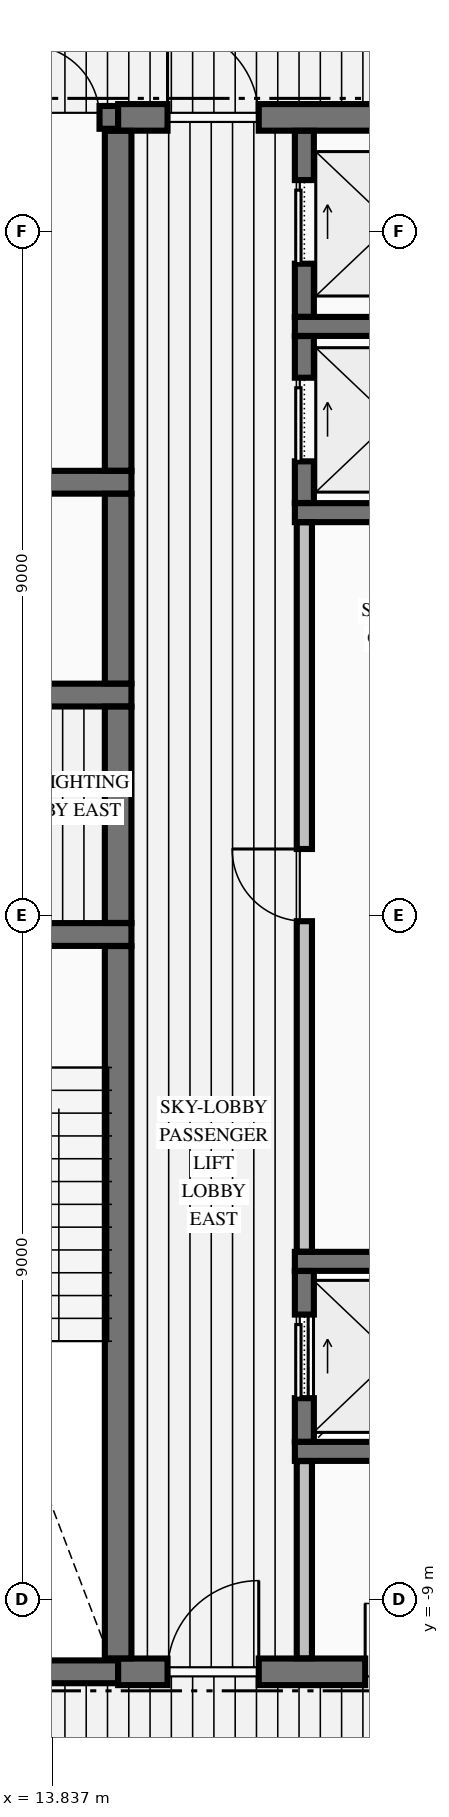
"""IFC4 building model, lengths in metres.
Left out: names, types, materials, properties, quantities, classifications, styles, units other than length and angle.
Written with IfcOpenShell. Run it as: python <this file> out.ifc"""

import sys

from ifc_helpers import new_model, si_unit, direction, frame, frame_2d, origin, place, context, subcontext, project, spatial, rectangle, extrude, element, fill, save


model = new_model("IFC4")
c1 = context("Model", 3, precision=1e-05, world=origin(), true_north=direction((0.0, 1.0)))
c2 = subcontext(c1, "Body", "Model", "MODEL_VIEW")
j1 = project(units=[si_unit("LENGTHUNIT", "METRE"), si_unit("PLANEANGLEUNIT", "RADIAN")], contexts=[c1])
p1 = place(None, origin())
s1 = spatial("IfcSite", under=j1, at=p1, CompositionType="ELEMENT")
p2 = place(p1, origin())
s2 = spatial("IfcBuilding", under=s1, at=p2, CompositionType="ELEMENT")
p3 = place(p2, frame((0.0, 0.0, 158.24)))
s3 = spatial("IfcBuildingStorey", under=s2, at=p3, CompositionType="ELEMENT", Elevation=158.24)
p4 = place(p3, frame((11.429, -9.95, 0.0), z_axis=(0.0, 0.0, 1.0), x_axis=(1.0, 0.0, 0.0)))
e1 = element("IfcWall", 1, at=p4, inside=s3, PredefinedType="SHEAR", context=c2, shape_type="SweptSolid", body=[
    extrude(rectangle(XDim=3.271, YDim=0.3, at=frame_2d((1.635, 0.0))), origin(), (0.0, 0.0, 1.0), 4.17),
])
p5 = place(p3, frame((14.7, -9.95, 0.0), z_axis=(0.0, 0.0, 1.0), x_axis=(1.0, 0.0, 0.0)))
e2 = element("IfcWall", 2, at=p5, inside=s3, PredefinedType="SHEAR", context=c2, shape_type="SweptSolid", body=[
    extrude(rectangle(XDim=4.871, YDim=0.35, at=frame_2d((2.436, 0.0))), origin(), (0.0, 0.0, 1.0), 4.17),
])
p6 = place(p5, frame((0.65, 0.0, 0.0)))
e3 = element("IfcOpeningElement", 3, at=p6, cuts=e2, PredefinedType="OPENING", context=c2, shape_type="SweptSolid", body=[
    extrude(rectangle(XDim=1.2, YDim=2.15, at=frame_2d((0.6, 1.075))), frame((0.0, 0.185, 0.0), z_axis=(0.0, -1.0, 0.0), x_axis=(1.0, 0.0, 0.0)), (0.0, 0.0, 1.0), 0.37),
])
p7 = place(p5, frame((3.25, 0.0, 0.0)))
e4 = element("IfcOpeningElement", 4, at=p7, cuts=e2, PredefinedType="OPENING", context=c2, shape_type="SweptSolid", body=[
    extrude(rectangle(XDim=0.9, YDim=2.15, at=frame_2d((0.45, 1.075))), frame((0.0, 0.185, 0.0), z_axis=(0.0, -1.0, 0.0), x_axis=(1.0, 0.0, 0.0)), (0.0, 0.0, 1.0), 0.37),
])
for number, where, z_axis, x_axis in (
    (5, (17.025, -7.05, 0.0), (0.0, 0.0, 1.0), (1.0, 0.0, 0.0)),
    (6, (17.025, -4.55, 0.0), (0.0, 0.0, 1.0), (1.0, 0.0, 0.0)),
):
    element("IfcWall", number, at=place(p3, frame(where, z_axis=z_axis, x_axis=x_axis)), inside=s3, PredefinedType="SOLIDWALL", context=c2, shape_type="SweptSolid", body=[
        extrude(rectangle(XDim=3.15, YDim=0.25, at=frame_2d((1.575, 0.0))), origin(), (0.0, 0.0, 1.0), 4.17),
    ])
p8 = place(p3, frame((11.429, -0.25, 0.0), z_axis=(0.0, 0.0, 1.0), x_axis=(1.0, 0.0, 0.0)))
e7 = element("IfcWall", 7, at=p8, inside=s3, PredefinedType="SHEAR", context=c2, shape_type="SweptSolid", body=[
    extrude(rectangle(XDim=3.446, YDim=0.3, at=frame_2d((1.723, 0.0))), origin(), (0.0, 0.0, 1.0), 4.17),
])
p9 = place(p8, frame((1.171, 0.0, 0.0)))
e8 = element("IfcOpeningElement", 8, at=p9, cuts=e7, PredefinedType="OPENING", context=c2, shape_type="SweptSolid", body=[
    extrude(rectangle(XDim=1.1, YDim=2.15, at=frame_2d((0.55, 1.075))), frame((0.0, 0.16, 0.0), z_axis=(0.0, -1.0, 0.0), x_axis=(1.0, 0.0, 0.0)), (0.0, 0.0, 1.0), 0.32),
])
p10 = place(p3, frame((10.85, 2.9, 0.0), z_axis=(0.0, 0.0, 1.0), x_axis=(1.0, 0.0, 0.0)))
e9 = element("IfcWall", 9, at=p10, inside=s3, PredefinedType="SHEAR", context=c2, shape_type="SweptSolid", body=[
    extrude(rectangle(XDim=4.025, YDim=0.3, at=frame_2d((2.012, 0.0))), origin(), (0.0, 0.0, 1.0), 4.17),
])
p11 = place(p10, frame((0.85, 0.0, 0.0)))
e10 = element("IfcOpeningElement", 10, at=p11, cuts=e9, PredefinedType="OPENING", context=c2, shape_type="SweptSolid", body=[
    extrude(rectangle(XDim=1.1, YDim=2.2, at=frame_2d((0.55, 1.1))), frame((0.0, 0.16, 0.0), z_axis=(0.0, -1.0, 0.0), x_axis=(1.0, 0.0, 0.0)), (0.0, 0.0, 1.0), 0.32),
])
p12 = place(p3, frame((17.025, 5.3, 0.0), z_axis=(0.0, 0.0, 1.0), x_axis=(1.0, 0.0, 0.0)))
e11 = element("IfcWall", 11, at=p12, inside=s3, PredefinedType="SOLIDWALL", context=c2, shape_type="SweptSolid", body=[
    extrude(rectangle(XDim=3.15, YDim=0.25, at=frame_2d((1.575, 0.0))), origin(), (0.0, 0.0, 1.0), 4.17),
])
p13 = place(p3, frame((10.85, 5.7, 0.0), z_axis=(0.0, 0.0, 1.0), x_axis=(1.0, 0.0, 0.0)))
e12 = element("IfcWall", 12, at=p13, inside=s3, PredefinedType="SHEAR", context=c2, shape_type="SweptSolid", body=[
    extrude(rectangle(XDim=4.025, YDim=0.3, at=frame_2d((2.012, 0.0))), origin(), (0.0, 0.0, 1.0), 4.17),
])
p14 = place(p3, frame((17.025, 7.75, 0.0), z_axis=(0.0, 0.0, 1.0), x_axis=(1.0, 0.0, 0.0)))
e13 = element("IfcWall", 13, at=p14, inside=s3, PredefinedType="SOLIDWALL", context=c2, shape_type="SweptSolid", body=[
    extrude(rectangle(XDim=3.15, YDim=0.25, at=frame_2d((1.575, 0.0))), origin(), (0.0, 0.0, 1.0), 4.17),
])
p15 = place(p3, frame((11.429, 10.5, 0.0), z_axis=(0.0, 0.0, 1.0), x_axis=(1.0, 0.0, 0.0)))
e14 = element("IfcWall", 14, at=p15, inside=s3, PredefinedType="SHEAR", context=c2, shape_type="SweptSolid", body=[
    extrude(rectangle(XDim=3.271, YDim=0.3, at=frame_2d((1.635, 0.0))), origin(), (0.0, 0.0, 1.0), 4.17),
])
p16 = place(p15, frame((2.076, 0.0, 0.0)))
e15 = element("IfcOpeningElement", 15, at=p16, cuts=e14, PredefinedType="OPENING", context=c2, shape_type="SweptSolid", body=[
    extrude(rectangle(XDim=0.95, YDim=2.15, at=frame_2d((0.475, 1.075))), frame((0.0, 0.16, 0.0), z_axis=(0.0, -1.0, 0.0), x_axis=(1.0, 0.0, 0.0)), (0.0, 0.0, 1.0), 0.32),
])
p17 = place(p3, frame((14.7, 10.5, 0.0), z_axis=(0.0, 0.0, 1.0), x_axis=(1.0, 0.0, 0.0)))
e16 = element("IfcWall", 16, at=p17, inside=s3, PredefinedType="SHEAR", context=c2, shape_type="SweptSolid", body=[
    extrude(rectangle(XDim=4.871, YDim=0.35, at=frame_2d((2.436, 0.0))), origin(), (0.0, 0.0, 1.0), 4.17),
])
p18 = place(p17, frame((0.65, 0.0, 0.0)))
e17 = element("IfcOpeningElement", 17, at=p18, cuts=e16, PredefinedType="OPENING", context=c2, shape_type="SweptSolid", body=[
    extrude(rectangle(XDim=1.2, YDim=2.15, at=frame_2d((0.6, 1.075))), frame((0.0, 0.185, 0.0), z_axis=(0.0, -1.0, 0.0), x_axis=(1.0, 0.0, 0.0)), (0.0, 0.0, 1.0), 0.37),
])
p19 = place(p3, frame((14.7, -9.773, 0.0), z_axis=(0.0, 0.0, 1.0), x_axis=(0.0, 1.0, 0.0)))
e18 = element("IfcWall", 18, at=p19, inside=s3, PredefinedType="SHEAR", context=c2, shape_type="SweptSolid", body=[
    extrude(rectangle(XDim=9.371, YDim=0.35, at=frame_2d((4.686, 0.0))), origin(), (0.0, 0.0, 1.0), 4.17),
])
p20 = place(p3, frame((14.7, -0.098, 0.0), z_axis=(0.0, 0.0, 1.0), x_axis=(0.0, 1.0, 0.0)))
e19 = element("IfcWall", 19, at=p20, inside=s3, PredefinedType="SHEAR", context=c2, shape_type="SweptSolid", body=[
    extrude(rectangle(XDim=2.846, YDim=0.35, at=frame_2d((1.423, 0.0))), origin(), (0.0, 0.0, 1.0), 4.17),
])
p21 = place(p3, frame((14.7, 3.052, 0.0), z_axis=(0.0, 0.0, 1.0), x_axis=(0.0, 1.0, 0.0)))
e20 = element("IfcWall", 20, at=p21, inside=s3, PredefinedType="SHEAR", context=c2, shape_type="SweptSolid", body=[
    extrude(rectangle(XDim=2.496, YDim=0.35, at=frame_2d((1.248, 0.0))), origin(), (0.0, 0.0, 1.0), 4.17),
])
p22 = place(p3, frame((14.7, 5.852, 0.0), z_axis=(0.0, 0.0, 1.0), x_axis=(0.0, 1.0, 0.0)))
e21 = element("IfcWall", 21, at=p22, inside=s3, PredefinedType="SHEAR", context=c2, shape_type="SweptSolid", body=[
    extrude(rectangle(XDim=4.471, YDim=0.35, at=frame_2d((2.235, 0.0))), origin(), (0.0, 0.0, 1.0), 4.17),
])
p23 = place(p3, frame((17.15, -6.923, 0.0), z_axis=(0.0, 0.0, 1.0), x_axis=(0.0, 1.0, 0.0)))
e22 = element("IfcWall", 22, at=p23, inside=s3, PredefinedType="SOLIDWALL", context=c2, shape_type="SweptSolid", body=[
    extrude(rectangle(XDim=2.246, YDim=0.25, at=frame_2d((1.123, 0.0))), origin(), (0.0, 0.0, 1.0), 4.17),
])
p24 = place(p23, frame((0.573, 0.0, 0.0)))
e23 = element("IfcOpeningElement", 23, at=p24, cuts=e22, PredefinedType="OPENING", context=c2, shape_type="SweptSolid", body=[
    extrude(rectangle(XDim=1.1, YDim=2.2, at=frame_2d((0.55, 1.1))), frame((0.0, 0.135, 0.0), z_axis=(0.0, -1.0, 0.0), x_axis=(1.0, 0.0, 0.0)), (0.0, 0.0, 1.0), 0.27),
])
p25 = place(p3, frame((17.15, 5.427, 0.0), z_axis=(0.0, 0.0, 1.0), x_axis=(0.0, 1.0, 0.0)))
e24 = element("IfcWall", 24, at=p25, inside=s3, PredefinedType="SOLIDWALL", context=c2, shape_type="SweptSolid", body=[
    extrude(rectangle(XDim=2.196, YDim=0.25, at=frame_2d((1.098, 0.0))), origin(), (0.0, 0.0, 1.0), 4.17),
])
p26 = place(p25, frame((0.548, 0.0, 0.0)))
e25 = element("IfcOpeningElement", 25, at=p26, cuts=e24, PredefinedType="OPENING", context=c2, shape_type="SweptSolid", body=[
    extrude(rectangle(XDim=1.1, YDim=2.2, at=frame_2d((0.55, 1.1))), frame((0.0, 0.135, 0.0), z_axis=(0.0, -1.0, 0.0), x_axis=(1.0, 0.0, 0.0)), (0.0, 0.0, 1.0), 0.27),
])
p27 = place(p3, frame((17.15, 7.877, 0.0), z_axis=(0.0, 0.0, 1.0), x_axis=(0.0, 1.0, 0.0)))
e26 = element("IfcWall", 26, at=p27, inside=s3, PredefinedType="SOLIDWALL", context=c2, shape_type="SweptSolid", body=[
    extrude(rectangle(XDim=2.446, YDim=0.25, at=frame_2d((1.223, 0.0))), origin(), (0.0, 0.0, 1.0), 4.17),
])
p28 = place(p27, frame((0.698, 0.0, 0.0)))
e27 = element("IfcOpeningElement", 27, at=p28, cuts=e26, PredefinedType="OPENING", context=c2, shape_type="SweptSolid", body=[
    extrude(rectangle(XDim=1.1, YDim=2.2, at=frame_2d((0.55, 1.1))), frame((0.0, 0.135, 0.0), z_axis=(0.0, -1.0, 0.0), x_axis=(1.0, 0.0, 0.0)), (0.0, 0.0, 1.0), 0.27),
])
p29 = place(p3, frame((17.15, -9.772, 0.0), z_axis=(0.0, 0.0, 1.0), x_axis=(0.0, 1.0, 0.0)))
e28 = element("IfcWall", 28, at=p29, inside=s3, PredefinedType="PARTITIONING", context=c2, shape_type="SweptSolid", body=[
    extrude(rectangle(XDim=2.594, YDim=0.2, at=frame_2d((1.297, 0.0))), origin(), (0.0, 0.0, 1.0), 4.17),
])
p30 = place(p3, frame((17.15, -4.422, 0.0), z_axis=(0.0, 0.0, 1.0), x_axis=(0.0, 1.0, 0.0)))
e29 = element("IfcWall", 29, at=p30, inside=s3, PredefinedType="PARTITIONING", context=c2, shape_type="SweptSolid", body=[
    extrude(rectangle(XDim=9.594, YDim=0.2, at=frame_2d((4.797, 0.0))), origin(), (0.0, 0.0, 1.0), 4.17),
])
p31 = place(p30, frame((4.347, 0.0, 0.0)))
e30 = element("IfcOpeningElement", 30, at=p31, cuts=e29, PredefinedType="OPENING", context=c2, shape_type="SweptSolid", body=[
    extrude(rectangle(XDim=0.95, YDim=2.15, at=frame_2d((0.475, 1.075))), frame((0.0, 0.11, 0.0), z_axis=(0.0, -1.0, 0.0), x_axis=(1.0, 0.0, 0.0)), (0.0, 0.0, 1.0), 0.22),
])
p32 = place(p16, origin())
e31 = element("IfcDoor", 31, at=p32, inside=s3, OperationType="SINGLE_SWING_LEFT", PredefinedType="DOOR", context=c2, shape_type="SweptSolid", body=[
    extrude(rectangle(XDim=0.95, YDim=2.15, at=frame_2d((0.475, 1.075))), frame((0.0, 0.025, 0.0), z_axis=(0.0, -1.0, 0.0), x_axis=(1.0, 0.0, 0.0)), (0.0, 0.0, 1.0), 0.05),
])
fill(e15, e31)
p33 = place(p24, origin())
e32 = element("IfcDoor", 32, at=p33, inside=s3, OperationType="SLIDING_TO_RIGHT", PredefinedType="DOOR", context=c2, shape_type="SweptSolid", body=[
    extrude(rectangle(XDim=1.1, YDim=2.2, at=frame_2d((0.55, 1.1))), frame((0.0, 0.025, 0.0), z_axis=(0.0, -1.0, 0.0), x_axis=(1.0, 0.0, 0.0)), (0.0, 0.0, 1.0), 0.05),
])
fill(e23, e32)
p34 = place(p26, origin())
e33 = element("IfcDoor", 33, at=p34, inside=s3, OperationType="SLIDING_TO_RIGHT", PredefinedType="DOOR", context=c2, shape_type="SweptSolid", body=[
    extrude(rectangle(XDim=1.1, YDim=2.2, at=frame_2d((0.55, 1.1))), frame((0.0, 0.025, 0.0), z_axis=(0.0, -1.0, 0.0), x_axis=(1.0, 0.0, 0.0)), (0.0, 0.0, 1.0), 0.05),
])
fill(e25, e33)
p35 = place(p28, origin())
e34 = element("IfcDoor", 34, at=p35, inside=s3, OperationType="SLIDING_TO_RIGHT", PredefinedType="DOOR", context=c2, shape_type="SweptSolid", body=[
    extrude(rectangle(XDim=1.1, YDim=2.2, at=frame_2d((0.55, 1.1))), frame((0.0, 0.025, 0.0), z_axis=(0.0, -1.0, 0.0), x_axis=(1.0, 0.0, 0.0)), (0.0, 0.0, 1.0), 0.05),
])
fill(e27, e34)
p36 = place(p6, origin())
e35 = element("IfcDoor", 35, at=p36, inside=s3, OperationType="SINGLE_SWING_RIGHT", PredefinedType="DOOR", context=c2, shape_type="SweptSolid", body=[
    extrude(rectangle(XDim=1.2, YDim=2.15, at=frame_2d((0.6, 1.075))), frame((0.0, 0.025, 0.0), z_axis=(0.0, -1.0, 0.0), x_axis=(1.0, 0.0, 0.0)), (0.0, 0.0, 1.0), 0.05),
])
fill(e3, e35)
p37 = place(p18, origin())
e36 = element("IfcDoor", 36, at=p37, inside=s3, OperationType="SINGLE_SWING_LEFT", PredefinedType="DOOR", context=c2, shape_type="SweptSolid", body=[
    extrude(rectangle(XDim=1.2, YDim=2.15, at=frame_2d((0.6, 1.075))), frame((0.0, 0.025, 0.0), z_axis=(0.0, -1.0, 0.0), x_axis=(1.0, 0.0, 0.0)), (0.0, 0.0, 1.0), 0.05),
])
fill(e17, e36)
p38 = place(p31, origin())
e37 = element("IfcDoor", 37, at=p38, inside=s3, OperationType="SINGLE_SWING_RIGHT", PredefinedType="DOOR", context=c2, shape_type="SweptSolid", body=[
    extrude(rectangle(XDim=0.95, YDim=2.15, at=frame_2d((0.475, 1.075))), frame((0.0, 0.025, 0.0), z_axis=(0.0, -1.0, 0.0), x_axis=(1.0, 0.0, 0.0)), (0.0, 0.0, 1.0), 0.05),
])
fill(e30, e37)
p39 = place(p7, origin())
e38 = element("IfcDoor", 38, at=p39, inside=s3, OperationType="SINGLE_SWING_LEFT", PredefinedType="DOOR", context=c2, shape_type="SweptSolid", body=[
    extrude(rectangle(XDim=0.9, YDim=2.15, at=frame_2d((0.45, 1.075))), frame((0.0, 0.025, 0.0), z_axis=(0.0, -1.0, 0.0), x_axis=(1.0, 0.0, 0.0)), (0.0, 0.0, 1.0), 0.05),
])
fill(e4, e38)
save(model, sys.argv[1])
